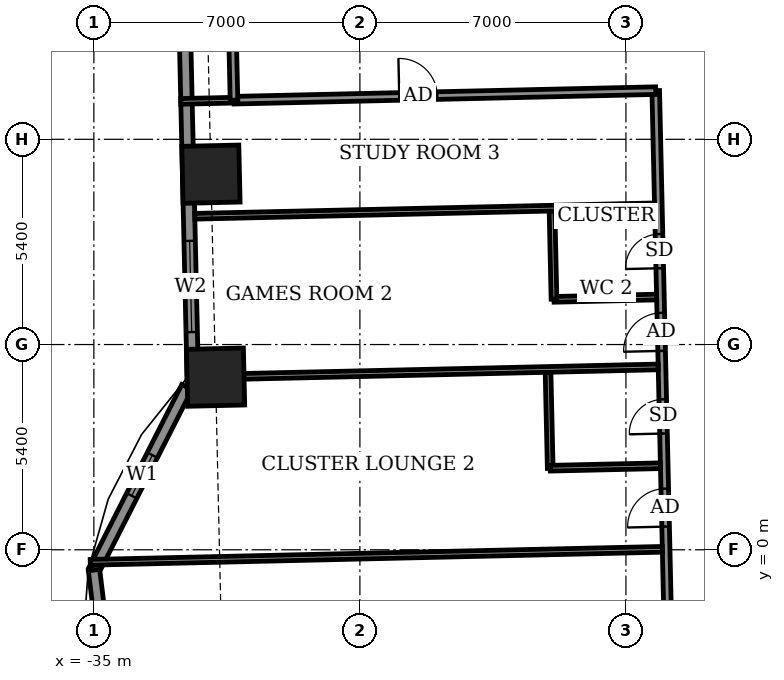
"""IFC4 building model, lengths in metres.
Left out: names, types, materials, properties, quantities, classifications, styles, units other than length and angle.
Written with IfcOpenShell. Run it as: python <this file> out.ifc"""

import sys

from ifc_helpers import new_model, si_unit, direction, frame, frame_2d, origin, origin_2d, place, context, subcontext, project, spatial, rectangle, extrude, element, fill, save


model = new_model("IFC4")
c1 = context("Model", 3, precision=1e-05, world=origin(), true_north=direction((0.0, 1.0)))
c2 = subcontext(c1, "Body", "Model", "MODEL_VIEW")
j1 = project(units=[si_unit("LENGTHUNIT", "METRE"), si_unit("PLANEANGLEUNIT", "RADIAN")], contexts=[c1])
p1 = place(None, origin())
s1 = spatial("IfcSite", under=j1, at=p1, CompositionType="ELEMENT")
p2 = place(p1, origin())
s2 = spatial("IfcBuilding", under=s1, at=p2, CompositionType="ELEMENT")
p3 = place(p2, frame((0.0, 0.0, 44.9)))
s3 = spatial("IfcBuildingStorey", under=s2, at=p3, CompositionType="ELEMENT", Elevation=44.9)
for number, where, z_axis, x_axis in (
    (1, (-31.919, 9.882, -0.55), (0.0, 0.0, 1.0), (0.023, -1.0, 0.0)),
    (2, (-31.798, 4.542, -0.55), (0.0, 0.0, 1.0), (0.023, -1.0, 0.0)),
):
    element("IfcColumn", number, at=place(p3, frame(where, z_axis=z_axis, x_axis=x_axis)), inside=s3, PredefinedType="COLUMN", context=c2, shape_type="SweptSolid", body=[
        extrude(rectangle(XDim=1.5, YDim=1.5, at=origin_2d()), origin(), (0.0, 0.0, 1.0), 3.6),
    ])
p4 = place(p3, frame((-32.758, 20.399, 0.0), z_axis=(0.0, 0.0, 1.0), x_axis=(0.022668485183, -0.999743036875, 0.0)))
e3 = element("IfcWall", 3, at=p4, inside=s3, PredefinedType="SOLIDWALL", context=c2, shape_type="SweptSolid", body=[
    extrude(rectangle(XDim=15.929, YDim=0.3, at=frame_2d((7.964, 0.0))), origin(), (0.0, 0.0, 1.0), 3.05),
])
p5 = place(p4, frame((2.17, 0.0, 0.0)))
e4 = element("IfcOpeningElement", 4, at=p5, cuts=e3, PredefinedType="OPENING", context=c2, shape_type="SweptSolid", body=[
    extrude(rectangle(XDim=1.5, YDim=2.4, at=frame_2d((0.75, 1.2))), frame((0.0, 0.16, 0.0), z_axis=(0.0, -1.0, 0.0), x_axis=(1.0, 0.0, 0.0)), (0.0, 0.0, 1.0), 0.32),
])
p6 = place(p4, frame((12.275, 0.0, 0.9)))
e5 = element("IfcOpeningElement", 5, at=p6, cuts=e3, PredefinedType="OPENING", context=c2, shape_type="SweptSolid", body=[
    extrude(rectangle(XDim=2.4, YDim=1.5, at=frame_2d((1.2, 0.75))), frame((0.0, 0.16, 0.0), z_axis=(0.0, -1.0, 0.0), x_axis=(1.0, 0.0, 0.0)), (0.0, 0.0, 1.0), 0.32),
])
p7 = place(p3, frame((-32.552, 4.28, 0.0), z_axis=(0.0, 0.0, 1.0), x_axis=(-0.452703975507, -0.891660871946, 0.0)))
e6 = element("IfcWall", 6, at=p7, inside=s3, PredefinedType="SOLIDWALL", context=c2, shape_type="SweptSolid", body=[
    extrude(rectangle(XDim=5.399, YDim=0.3, at=frame_2d((2.699, 0.0))), origin(), (0.0, 0.0, 1.0), 3.05),
])
p8 = place(p7, frame((2.007, 0.0, 0.9)))
e7 = element("IfcOpeningElement", 7, at=p8, cuts=e6, PredefinedType="OPENING", context=c2, shape_type="SweptSolid", body=[
    extrude(rectangle(XDim=1.2, YDim=1.5, at=frame_2d((0.6, 0.75))), frame((0.0, 0.16, 0.0), z_axis=(0.0, -1.0, 0.0), x_axis=(1.0, 0.0, 0.0)), (0.0, 0.0, 1.0), 0.32),
])
p9 = place(p3, frame((-34.996, -0.534, 0.0), z_axis=(0.0, 0.0, 1.0), x_axis=(0.122206978992, -0.992504636909, 0.0)))
e8 = element("IfcWall", 8, at=p9, inside=s3, PredefinedType="SOLIDWALL", context=c2, shape_type="SweptSolid", body=[
    extrude(rectangle(XDim=5.574, YDim=0.3, at=frame_2d((2.787, 0.0))), origin(), (0.0, 0.0, 1.0), 3.05),
])
p10 = place(p9, frame((2.187, 0.0, 0.9)))
e9 = element("IfcOpeningElement", 9, at=p10, cuts=e8, PredefinedType="OPENING", context=c2, shape_type="SweptSolid", body=[
    extrude(rectangle(XDim=1.2, YDim=1.5, at=frame_2d((0.6, 0.75))), frame((0.0, 0.16, 0.0), z_axis=(0.0, -1.0, 0.0), x_axis=(1.0, 0.0, 0.0)), (0.0, 0.0, 1.0), 0.32),
])
p11 = place(p3, frame((-33.918, 7.62, 0.0), z_axis=(0.0, 0.0, 1.0), x_axis=(-0.022666865795, 0.999743073592, 0.0)))
e10 = element("IfcWall", 10, at=p11, inside=s3, PredefinedType="USERDEFINED", context=c2, shape_type="SweptSolid", body=[
    extrude(rectangle(XDim=5.999, YDim=0.55, at=frame_2d((3.0, 0.0))), origin(), (0.0, 0.0, 1.0), 0.8),
])
p12 = place(p3, frame((-19.589, -15.562, 0.0), z_axis=(0.0, 0.0, 1.0), x_axis=(-0.02267447203, 0.999742901109, 0.0)))
e11 = element("IfcWall", 11, at=p12, inside=s3, PredefinedType="PARTITIONING", context=c2, shape_type="SweptSolid", body=[
    extrude(rectangle(XDim=27.65, YDim=0.2, at=frame_2d((13.825, 0.0))), origin(), (0.0, 0.0, 1.0), 3.05),
])
p13 = place(p12, frame((20.8, 0.0, 0.0)))
e12 = element("IfcOpeningElement", 12, at=p13, cuts=e11, PredefinedType="OPENING", context=c2, shape_type="SweptSolid", body=[
    extrude(rectangle(XDim=1.0, YDim=2.1, at=frame_2d((0.5, 1.05))), frame((0.0, 0.11, 0.0), z_axis=(0.0, -1.0, 0.0), x_axis=(1.0, 0.0, 0.0)), (0.0, 0.0, 1.0), 0.22),
])
p14 = place(p12, frame((22.975, 0.0, 0.0)))
e13 = element("IfcOpeningElement", 13, at=p14, cuts=e11, PredefinedType="OPENING", context=c2, shape_type="SweptSolid", body=[
    extrude(rectangle(XDim=0.9, YDim=2.1, at=frame_2d((0.45, 1.05))), frame((0.0, 0.11, 0.0), z_axis=(0.0, -1.0, 0.0), x_axis=(1.0, 0.0, 0.0)), (0.0, 0.0, 1.0), 0.22),
])
p15 = place(p12, frame((16.175, 0.0, 0.0)))
e14 = element("IfcOpeningElement", 14, at=p15, cuts=e11, PredefinedType="OPENING", context=c2, shape_type="SweptSolid", body=[
    extrude(rectangle(XDim=1.0, YDim=2.1, at=frame_2d((0.5, 1.05))), frame((0.0, 0.11, 0.0), z_axis=(0.0, -1.0, 0.0), x_axis=(1.0, 0.0, 0.0)), (0.0, 0.0, 1.0), 0.22),
])
p16 = place(p12, frame((18.625, 0.0, 0.0)))
e15 = element("IfcOpeningElement", 15, at=p16, cuts=e11, PredefinedType="OPENING", context=c2, shape_type="SweptSolid", body=[
    extrude(rectangle(XDim=0.9, YDim=2.1, at=frame_2d((0.45, 1.05))), frame((0.0, 0.11, 0.0), z_axis=(0.0, -1.0, 0.0), x_axis=(1.0, 0.0, 0.0)), (0.0, 0.0, 1.0), 0.22),
])
p17 = place(p12, frame((12.95, 0.0, 0.0)))
e16 = element("IfcOpeningElement", 16, at=p17, cuts=e11, PredefinedType="OPENING", context=c2, shape_type="SweptSolid", body=[
    extrude(rectangle(XDim=1.0, YDim=2.1, at=frame_2d((0.5, 1.05))), frame((0.0, 0.11, 0.0), z_axis=(0.0, -1.0, 0.0), x_axis=(1.0, 0.0, 0.0)), (0.0, 0.0, 1.0), 0.22),
])
p18 = place(p12, frame((9.775, 0.0, 0.0)))
e17 = element("IfcOpeningElement", 17, at=p18, cuts=e11, PredefinedType="OPENING", context=c2, shape_type="SweptSolid", body=[
    extrude(rectangle(XDim=1.0, YDim=2.1, at=frame_2d((0.5, 1.05))), frame((0.0, 0.11, 0.0), z_axis=(0.0, -1.0, 0.0), x_axis=(1.0, 0.0, 0.0)), (0.0, 0.0, 1.0), 0.22),
])
p19 = place(p12, frame((7.475, 0.0, 0.0)))
e18 = element("IfcOpeningElement", 18, at=p19, cuts=e11, PredefinedType="OPENING", context=c2, shape_type="SweptSolid", body=[
    extrude(rectangle(XDim=0.9, YDim=2.1, at=frame_2d((0.45, 1.05))), frame((0.0, 0.11, 0.0), z_axis=(0.0, -1.0, 0.0), x_axis=(1.0, 0.0, 0.0)), (0.0, 0.0, 1.0), 0.22),
])
p20 = place(p12, frame((1.612, 0.0, 0.0)))
e19 = element("IfcOpeningElement", 19, at=p20, cuts=e11, PredefinedType="OPENING", context=c2, shape_type="SweptSolid", body=[
    extrude(rectangle(XDim=1.0, YDim=2.1, at=frame_2d((0.5, 1.05))), frame((0.0, 0.11, 0.0), z_axis=(0.0, -1.0, 0.0), x_axis=(1.0, 0.0, 0.0)), (0.0, 0.0, 1.0), 0.22),
])
p21 = place(p12, frame((4.975, 0.0, 0.0)))
e20 = element("IfcOpeningElement", 20, at=p21, cuts=e11, PredefinedType="OPENING", context=c2, shape_type="SweptSolid", body=[
    extrude(rectangle(XDim=0.9, YDim=2.1, at=frame_2d((0.45, 1.05))), frame((0.0, 0.11, 0.0), z_axis=(0.0, -1.0, 0.0), x_axis=(1.0, 0.0, 0.0)), (0.0, 0.0, 1.0), 0.22),
])
p22 = place(p3, frame((-35.095, -0.33, 0.0), z_axis=(0.0, 0.0, 1.0), x_axis=(0.999741944356, 0.022716617157, 0.0)))
e21 = element("IfcWall", 21, at=p22, inside=s3, PredefinedType="PARTITIONING", context=c2, shape_type="SweptSolid", body=[
    extrude(rectangle(XDim=15.057, YDim=0.15, at=frame_2d((7.528, 0.0))), origin(), (0.0, 0.0, 1.0), 2.05),
])
p23 = place(p3, frame((-22.992, 2.141, 0.0), z_axis=(0.0, 0.0, 1.0), x_axis=(-0.022629142889, 0.99974392816, 0.0)))
e22 = element("IfcWall", 22, at=p23, inside=s3, PredefinedType="PARTITIONING", context=c2, shape_type="SweptSolid", body=[
    extrude(rectangle(XDim=2.525, YDim=0.15, at=frame_2d((1.262, 0.0))), origin(), (0.0, 0.0, 1.0), 3.05),
])
p24 = place(p3, frame((-22.992, 2.146, 0.0), z_axis=(0.0, 0.0, 1.0), x_axis=(0.999749340989, 0.022388729138, 0.0)))
e23 = element("IfcWall", 23, at=p24, inside=s3, PredefinedType="PARTITIONING", context=c2, shape_type="SweptSolid", body=[
    extrude(rectangle(XDim=2.901, YDim=0.15, at=frame_2d((1.45, 0.0))), origin(), (0.0, 0.0, 1.0), 3.05),
])
p25 = place(p3, frame((-32.248, 4.536, 0.0), z_axis=(0.0, 0.0, 1.0), x_axis=(0.999741439573, 0.022738821441, 0.0)))
e24 = element("IfcWall", 24, at=p25, inside=s3, PredefinedType="PARTITIONING", context=c2, shape_type="SweptSolid", body=[
    extrude(rectangle(XDim=12.1, YDim=0.15, at=frame_2d((6.05, 0.0))), origin(), (0.0, 0.0, 1.0), 3.05),
])
p26 = place(p3, frame((-22.892, 6.589, 0.0), z_axis=(0.0, 0.0, 1.0), x_axis=(0.999746436932, 0.022518033722, 0.0)))
e25 = element("IfcWall", 25, at=p26, inside=s3, PredefinedType="PARTITIONING", context=c2, shape_type="SweptSolid", body=[
    extrude(rectangle(XDim=2.7, YDim=0.15, at=frame_2d((1.35, 0.0))), origin(), (0.0, 0.0, 1.0), 3.05),
])
p27 = place(p3, frame((-22.893, 6.594, 0.0), z_axis=(0.0, 0.0, 1.0), x_axis=(-0.022370700241, 0.999749744571, 0.0)))
e26 = element("IfcWall", 26, at=p27, inside=s3, PredefinedType="PARTITIONING", context=c2, shape_type="SweptSolid", body=[
    extrude(rectangle(XDim=2.324, YDim=0.15, at=frame_2d((1.162, 0.0))), origin(), (0.0, 0.0, 1.0), 3.05),
])
p28 = place(p3, frame((-32.344, 8.775, 0.0), z_axis=(0.0, 0.0, 1.0), x_axis=(0.999741387404, 0.022741115019, 0.0)))
e27 = element("IfcWall", 27, at=p28, inside=s3, PredefinedType="PARTITIONING", context=c2, shape_type="SweptSolid", body=[
    extrude(rectangle(XDim=12.099, YDim=0.15, at=frame_2d((6.05, 0.0))), origin(), (0.0, 0.0, 1.0), 2.55),
])
p29 = place(p3, frame((-32.713, 11.798, 0.0), z_axis=(0.0, 0.0, 1.0), x_axis=(0.999756172383, 0.022081571112, 0.0)))
e28 = element("IfcWall", 28, at=p29, inside=s3, PredefinedType="PARTITIONING", context=c2, shape_type="SweptSolid", body=[
    extrude(rectangle(XDim=1.404, YDim=0.15, at=frame_2d((0.702, 0.0))), origin(), (0.0, 0.0, 1.0), 2.55),
])
p30 = place(p3, frame((-31.313, 11.829, 0.0), z_axis=(0.0, 0.0, 1.0), x_axis=(0.999742346277, 0.022698921993, 0.0)))
e29 = element("IfcWall", 29, at=p30, inside=s3, PredefinedType="PARTITIONING", context=c2, shape_type="SweptSolid", body=[
    extrude(rectangle(XDim=11.1, YDim=0.2, at=frame_2d((5.55, 0.0))), origin(), (0.0, 0.0, 1.0), 3.05),
])
p31 = place(p30, frame((4.35, 0.0, 0.0)))
e30 = element("IfcOpeningElement", 30, at=p31, cuts=e29, PredefinedType="OPENING", context=c2, shape_type="SweptSolid", body=[
    extrude(rectangle(XDim=1.0, YDim=2.1, at=frame_2d((0.5, 1.05))), frame((0.0, 0.11, 0.0), z_axis=(0.0, -1.0, 0.0), x_axis=(1.0, 0.0, 0.0)), (0.0, 0.0, 1.0), 0.22),
])
p32 = place(p3, frame((-31.313, 11.829, 0.0), z_axis=(0.0, 0.0, 1.0), x_axis=(-0.022617910375, 0.999744182344, 0.0)))
e31 = element("IfcWall", 31, at=p32, inside=s3, PredefinedType="PARTITIONING", context=c2, shape_type="SweptSolid", body=[
    extrude(rectangle(XDim=1.5, YDim=0.2, at=frame_2d((0.75, 0.0))), origin(), (0.0, 0.0, 1.0), 3.05),
])
p33 = place(p6, origin())
e32 = element("IfcWindow", 32, at=p33, inside=s3, PartitioningType="DOUBLE_PANEL_VERTICAL", PredefinedType="WINDOW", context=c2, shape_type="SweptSolid", body=[
    extrude(rectangle(XDim=2.4, YDim=1.5, at=frame_2d((1.2, 0.75))), frame((0.0, 0.03, 0.0), z_axis=(0.0, -1.0, 0.0), x_axis=(1.0, 0.0, 0.0)), (0.0, 0.0, 1.0), 0.06),
])
fill(e5, e32)
p34 = place(p8, origin())
e33 = element("IfcWindow", 33, at=p34, inside=s3, PartitioningType="SINGLE_PANEL", PredefinedType="WINDOW", context=c2, shape_type="SweptSolid", body=[
    extrude(rectangle(XDim=1.2, YDim=1.5, at=frame_2d((0.6, 0.75))), frame((0.0, 0.03, 0.0), z_axis=(0.0, -1.0, 0.0), x_axis=(1.0, 0.0, 0.0)), (0.0, 0.0, 1.0), 0.06),
])
fill(e7, e33)
p35 = place(p31, origin())
e34 = element("IfcDoor", 34, at=p35, inside=s3, OperationType="SINGLE_SWING_RIGHT", PredefinedType="DOOR", context=c2, shape_type="SweptSolid", body=[
    extrude(rectangle(XDim=1.0, YDim=2.1, at=frame_2d((0.5, 1.05))), frame((0.0, 0.025, 0.0), z_axis=(0.0, -1.0, 0.0), x_axis=(1.0, 0.0, 0.0)), (0.0, 0.0, 1.0), 0.05),
])
fill(e30, e34)
p36 = place(p13, origin())
e35 = element("IfcDoor", 35, at=p36, inside=s3, OperationType="SINGLE_SWING_LEFT", PredefinedType="DOOR", context=c2, shape_type="SweptSolid", body=[
    extrude(rectangle(XDim=1.0, YDim=2.1, at=frame_2d((0.5, 1.05))), frame((0.0, 0.025, 0.0), z_axis=(0.0, -1.0, 0.0), x_axis=(1.0, 0.0, 0.0)), (0.0, 0.0, 1.0), 0.05),
])
fill(e12, e35)
p37 = place(p14, origin())
e36 = element("IfcDoor", 36, at=p37, inside=s3, OperationType="SINGLE_SWING_RIGHT", PredefinedType="DOOR", context=c2, shape_type="SweptSolid", body=[
    extrude(rectangle(XDim=0.9, YDim=2.1, at=frame_2d((0.45, 1.05))), frame((0.0, 0.025, 0.0), z_axis=(0.0, -1.0, 0.0), x_axis=(1.0, 0.0, 0.0)), (0.0, 0.0, 1.0), 0.05),
])
fill(e13, e36)
p38 = place(p15, origin())
e37 = element("IfcDoor", 37, at=p38, inside=s3, OperationType="SINGLE_SWING_RIGHT", PredefinedType="DOOR", context=c2, shape_type="SweptSolid", body=[
    extrude(rectangle(XDim=1.0, YDim=2.1, at=frame_2d((0.5, 1.05))), frame((0.0, 0.025, 0.0), z_axis=(0.0, -1.0, 0.0), x_axis=(1.0, 0.0, 0.0)), (0.0, 0.0, 1.0), 0.05),
])
fill(e14, e37)
p39 = place(p16, origin())
e38 = element("IfcDoor", 38, at=p39, inside=s3, OperationType="SINGLE_SWING_LEFT", PredefinedType="DOOR", context=c2, shape_type="SweptSolid", body=[
    extrude(rectangle(XDim=0.9, YDim=2.1, at=frame_2d((0.45, 1.05))), frame((0.0, 0.025, 0.0), z_axis=(0.0, -1.0, 0.0), x_axis=(1.0, 0.0, 0.0)), (0.0, 0.0, 1.0), 0.05),
])
fill(e15, e38)
save(model, sys.argv[1])
